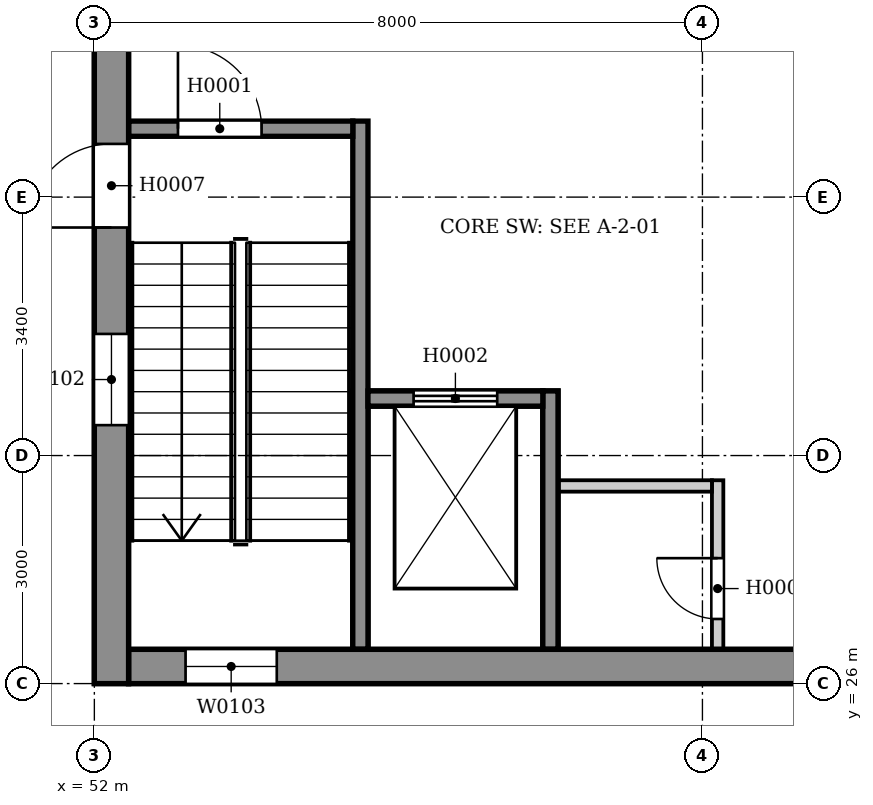
"""IFC4 building model, lengths in metres.
Left out: names, types, materials, properties, quantities, classifications, styles, units other than length and angle.
Written with IfcOpenShell. Run it as: python <this file> out.ifc"""

import sys

from ifc_helpers import new_model, si_unit, direction, frame, frame_2d, origin, place, context, subcontext, project, spatial, rectangle, extrude, element, fill, save


model = new_model("IFC4")
c1 = context("Model", 3, precision=1e-05, world=origin(), true_north=direction((0.0, 1.0)))
c2 = subcontext(c1, "Body", "Model", "MODEL_VIEW")
j1 = project(units=[si_unit("LENGTHUNIT", "METRE"), si_unit("PLANEANGLEUNIT", "RADIAN")], contexts=[c1])
p1 = place(None, origin())
s1 = spatial("IfcSite", under=j1, at=p1, CompositionType="ELEMENT")
p2 = place(p1, origin())
s2 = spatial("IfcBuilding", under=s1, at=p2, CompositionType="ELEMENT")
p3 = place(p2, origin())
s3 = spatial("IfcBuildingStorey", under=s2, at=p3, CompositionType="ELEMENT", Elevation=0.0)
p4 = place(p3, frame((52.225, 26.0, -1.6), z_axis=(0.0, 0.0, 1.0), x_axis=(0.0, 1.0, 0.0)))
e1 = element("IfcWall", 1, at=p4, inside=s3, PredefinedType="ELEMENTEDWALL", context=c2, shape_type="SweptSolid", body=[
    extrude(rectangle(XDim=12.0, YDim=0.45, at=frame_2d((6.0, 0.0))), origin(), (0.0, 0.0, 1.0), 1.35),
])
p5 = place(p3, frame((52.225, 26.0, 0.0), z_axis=(0.0, 0.0, 1.0), x_axis=(0.0, 1.0, 0.0)))
e2 = element("IfcWall", 2, at=p5, inside=s3, PredefinedType="ELEMENTEDWALL", context=c2, shape_type="SweptSolid", body=[
    extrude(rectangle(XDim=12.0, YDim=0.45, at=frame_2d((6.0, 0.0))), origin(), (0.0, 0.0, 1.0), 5.0),
])
p6 = place(p5, frame((6.0, 0.0, 0.0)))
e3 = element("IfcOpeningElement", 3, at=p6, cuts=e2, PredefinedType="OPENING", context=c2, shape_type="SweptSolid", body=[
    extrude(rectangle(XDim=1.1, YDim=2.1, at=frame_2d((0.55, 1.05))), frame((0.0, 0.235, 0.0), z_axis=(0.0, -1.0, 0.0), x_axis=(1.0, 0.0, 0.0)), (0.0, 0.0, 1.0), 0.47),
])
p7 = place(p5, frame((3.4, 0.0, 0.6)))
e4 = element("IfcOpeningElement", 4, at=p7, cuts=e2, PredefinedType="OPENING", context=c2, shape_type="SweptSolid", body=[
    extrude(rectangle(XDim=1.2, YDim=3.0, at=frame_2d((0.6, 1.5))), frame((0.0, 0.235, 0.0), z_axis=(0.0, -1.0, 0.0), x_axis=(1.0, 0.0, 0.0)), (0.0, 0.0, 1.0), 0.47),
])
p8 = place(p3, frame((52.45, 26.225, -1.6), z_axis=(0.0, 0.0, 1.0), x_axis=(1.0, 0.0, 0.0)))
e5 = element("IfcWall", 5, at=p8, inside=s3, PredefinedType="ELEMENTEDWALL", context=c2, shape_type="SweptSolid", body=[
    extrude(rectangle(XDim=11.55, YDim=0.45, at=frame_2d((5.775, 0.0))), origin(), (0.0, 0.0, 1.0), 1.35),
])
p9 = place(p3, frame((52.45, 26.225, 0.0), z_axis=(0.0, 0.0, 1.0), x_axis=(1.0, 0.0, 0.0)))
e6 = element("IfcWall", 6, at=p9, inside=s3, PredefinedType="ELEMENTEDWALL", context=c2, shape_type="SweptSolid", body=[
    extrude(rectangle(XDim=11.55, YDim=0.45, at=frame_2d((5.775, 0.0))), origin(), (0.0, 0.0, 1.0), 5.0),
])
p10 = place(p9, frame((0.75, 0.0, 0.6)))
e7 = element("IfcOpeningElement", 7, at=p10, cuts=e6, PredefinedType="OPENING", context=c2, shape_type="SweptSolid", body=[
    extrude(rectangle(XDim=1.2, YDim=3.0, at=frame_2d((0.6, 1.5))), frame((0.0, 0.235, 0.0), z_axis=(0.0, -1.0, 0.0), x_axis=(1.0, 0.0, 0.0)), (0.0, 0.0, 1.0), 0.47),
])
p11 = place(p3, frame((55.5, 26.45, 0.0), z_axis=(0.0, 0.0, 1.0), x_axis=(0.0, 1.0, 0.0)))
e8 = element("IfcWall", 8, at=p11, inside=s3, PredefinedType="SOLIDWALL", context=c2, shape_type="SweptSolid", body=[
    extrude(rectangle(XDim=6.95, YDim=0.2, at=frame_2d((3.475, 0.0))), origin(), (0.0, 0.0, 1.0), 5.0),
])
p12 = place(p3, frame((52.45, 33.3, 0.0), z_axis=(0.0, 0.0, 1.0), x_axis=(1.0, 0.0, 0.0)))
e9 = element("IfcWall", 9, at=p12, inside=s3, PredefinedType="SOLIDWALL", context=c2, shape_type="SweptSolid", body=[
    extrude(rectangle(XDim=2.95, YDim=0.2, at=frame_2d((1.475, 0.0))), origin(), (0.0, 0.0, 1.0), 5.0),
])
p13 = place(p12, frame((0.65, 0.0, 0.0)))
e10 = element("IfcOpeningElement", 10, at=p13, cuts=e9, PredefinedType="OPENING", context=c2, shape_type="SweptSolid", body=[
    extrude(rectangle(XDim=1.1, YDim=2.1, at=frame_2d((0.55, 1.05))), frame((0.0, 0.11, 0.0), z_axis=(0.0, -1.0, 0.0), x_axis=(1.0, 0.0, 0.0)), (0.0, 0.0, 1.0), 0.22),
])
p14 = place(p3, frame((58.0, 26.45, 0.0), z_axis=(0.0, 0.0, 1.0), x_axis=(0.0, 1.0, 0.0)))
e11 = element("IfcWall", 11, at=p14, inside=s3, PredefinedType="SOLIDWALL", context=c2, shape_type="SweptSolid", body=[
    extrude(rectangle(XDim=3.4, YDim=0.2, at=frame_2d((1.7, 0.0))), origin(), (0.0, 0.0, 1.0), 5.0),
])
p15 = place(p3, frame((55.6, 29.75, 0.0), z_axis=(0.0, 0.0, 1.0), x_axis=(1.0, 0.0, 0.0)))
e12 = element("IfcWall", 12, at=p15, inside=s3, PredefinedType="SOLIDWALL", context=c2, shape_type="SweptSolid", body=[
    extrude(rectangle(XDim=2.3, YDim=0.2, at=frame_2d((1.15, 0.0))), origin(), (0.0, 0.0, 1.0), 5.0),
])
p16 = place(p15, frame((0.6, 0.0, 0.0)))
e13 = element("IfcOpeningElement", 13, at=p16, cuts=e12, PredefinedType="OPENING", context=c2, shape_type="SweptSolid", body=[
    extrude(rectangle(XDim=1.1, YDim=2.1, at=frame_2d((0.55, 1.05))), frame((0.0, 0.11, 0.0), z_axis=(0.0, -1.0, 0.0), x_axis=(1.0, 0.0, 0.0)), (0.0, 0.0, 1.0), 0.22),
])
p17 = place(p3, frame((58.1, 28.6, 0.0), z_axis=(0.0, 0.0, 1.0), x_axis=(1.0, 0.0, 0.0)))
e14 = element("IfcWall", 14, at=p17, inside=s3, PredefinedType="PARTITIONING", context=c2, shape_type="SweptSolid", body=[
    extrude(rectangle(XDim=2.025, YDim=0.15, at=frame_2d((1.012, 0.0))), origin(), (0.0, 0.0, 1.0), 4.75),
])
p18 = place(p3, frame((60.2, 26.45, 0.0), z_axis=(0.0, 0.0, 1.0), x_axis=(0.0, 1.0, 0.0)))
e15 = element("IfcWall", 15, at=p18, inside=s3, PredefinedType="PARTITIONING", context=c2, shape_type="SweptSolid", body=[
    extrude(rectangle(XDim=2.225, YDim=0.15, at=frame_2d((1.113, 0.0))), origin(), (0.0, 0.0, 1.0), 4.75),
])
p19 = place(p18, frame((0.4, 0.0, 0.0)))
e16 = element("IfcOpeningElement", 16, at=p19, cuts=e15, PredefinedType="OPENING", context=c2, shape_type="SweptSolid", body=[
    extrude(rectangle(XDim=0.8, YDim=2.1, at=frame_2d((0.4, 1.05))), frame((0.0, 0.085, 0.0), z_axis=(0.0, -1.0, 0.0), x_axis=(1.0, 0.0, 0.0)), (0.0, 0.0, 1.0), 0.17),
])
for number, where, z_axis, x_axis in (
    (17, (55.5, 26.45, -1.3), (0.0, 0.0, 1.0), (0.0, 1.0, 0.0)),
    (18, (58.0, 26.45, -1.3), (0.0, 0.0, 1.0), (0.0, 1.0, 0.0)),
):
    element("IfcWall", number, at=place(p3, frame(where, z_axis=z_axis, x_axis=x_axis)), inside=s3, PredefinedType="SOLIDWALL", context=c2, shape_type="SweptSolid", body=[
        extrude(rectangle(XDim=3.4, YDim=0.2, at=frame_2d((1.7, 0.0))), origin(), (0.0, 0.0, 1.0), 1.05),
    ])
p20 = place(p3, frame((55.6, 29.75, -1.3), z_axis=(0.0, 0.0, 1.0), x_axis=(1.0, 0.0, 0.0)))
e19 = element("IfcWall", 19, at=p20, inside=s3, PredefinedType="SOLIDWALL", context=c2, shape_type="SweptSolid", body=[
    extrude(rectangle(XDim=2.3, YDim=0.2, at=frame_2d((1.15, 0.0))), origin(), (0.0, 0.0, 1.0), 1.05),
])
p21 = place(p13, origin())
e20 = element("IfcDoor", 20, at=p21, inside=s3, OperationType="SINGLE_SWING_LEFT", PredefinedType="DOOR", context=c2, shape_type="SweptSolid", body=[
    extrude(rectangle(XDim=1.1, YDim=2.1, at=frame_2d((0.55, 1.05))), frame((0.0, 0.025, 0.0), z_axis=(0.0, -1.0, 0.0), x_axis=(1.0, 0.0, 0.0)), (0.0, 0.0, 1.0), 0.05),
])
fill(e10, e20)
p22 = place(p16, origin())
e21 = element("IfcDoor", 21, at=p22, inside=s3, OperationType="DOUBLE_DOOR_SLIDING", PredefinedType="DOOR", context=c2, shape_type="SweptSolid", body=[
    extrude(rectangle(XDim=1.1, YDim=2.1, at=frame_2d((0.55, 1.05))), frame((0.0, 0.025, 0.0), z_axis=(0.0, -1.0, 0.0), x_axis=(1.0, 0.0, 0.0)), (0.0, 0.0, 1.0), 0.05),
])
fill(e13, e21)
p23 = place(p19, origin())
e22 = element("IfcDoor", 22, at=p23, inside=s3, OperationType="SINGLE_SWING_RIGHT", PredefinedType="DOOR", context=c2, shape_type="SweptSolid", body=[
    extrude(rectangle(XDim=0.8, YDim=2.1, at=frame_2d((0.4, 1.05))), frame((0.0, 0.025, 0.0), z_axis=(0.0, -1.0, 0.0), x_axis=(1.0, 0.0, 0.0)), (0.0, 0.0, 1.0), 0.05),
])
fill(e16, e22)
p24 = place(p6, origin())
e23 = element("IfcDoor", 23, at=p24, inside=s3, OperationType="SINGLE_SWING_LEFT", PredefinedType="DOOR", context=c2, shape_type="SweptSolid", body=[
    extrude(rectangle(XDim=1.1, YDim=2.1, at=frame_2d((0.55, 1.05))), frame((0.0, 0.025, 0.0), z_axis=(0.0, -1.0, 0.0), x_axis=(1.0, 0.0, 0.0)), (0.0, 0.0, 1.0), 0.05),
])
fill(e3, e23)
p25 = place(p7, origin())
e24 = element("IfcWindow", 24, at=p25, inside=s3, PartitioningType="SINGLE_PANEL", PredefinedType="WINDOW", context=c2, shape_type="SweptSolid", body=[
    extrude(rectangle(XDim=1.2, YDim=3.0, at=frame_2d((0.6, 1.5))), frame((0.0, 0.03, 0.0), z_axis=(0.0, -1.0, 0.0), x_axis=(1.0, 0.0, 0.0)), (0.0, 0.0, 1.0), 0.06),
])
fill(e4, e24)
p26 = place(p10, origin())
e25 = element("IfcWindow", 25, at=p26, inside=s3, PartitioningType="SINGLE_PANEL", PredefinedType="WINDOW", context=c2, shape_type="SweptSolid", body=[
    extrude(rectangle(XDim=1.2, YDim=3.0, at=frame_2d((0.6, 1.5))), frame((0.0, 0.03, 0.0), z_axis=(0.0, -1.0, 0.0), x_axis=(1.0, 0.0, 0.0)), (0.0, 0.0, 1.0), 0.06),
])
fill(e7, e25)
save(model, sys.argv[1])
